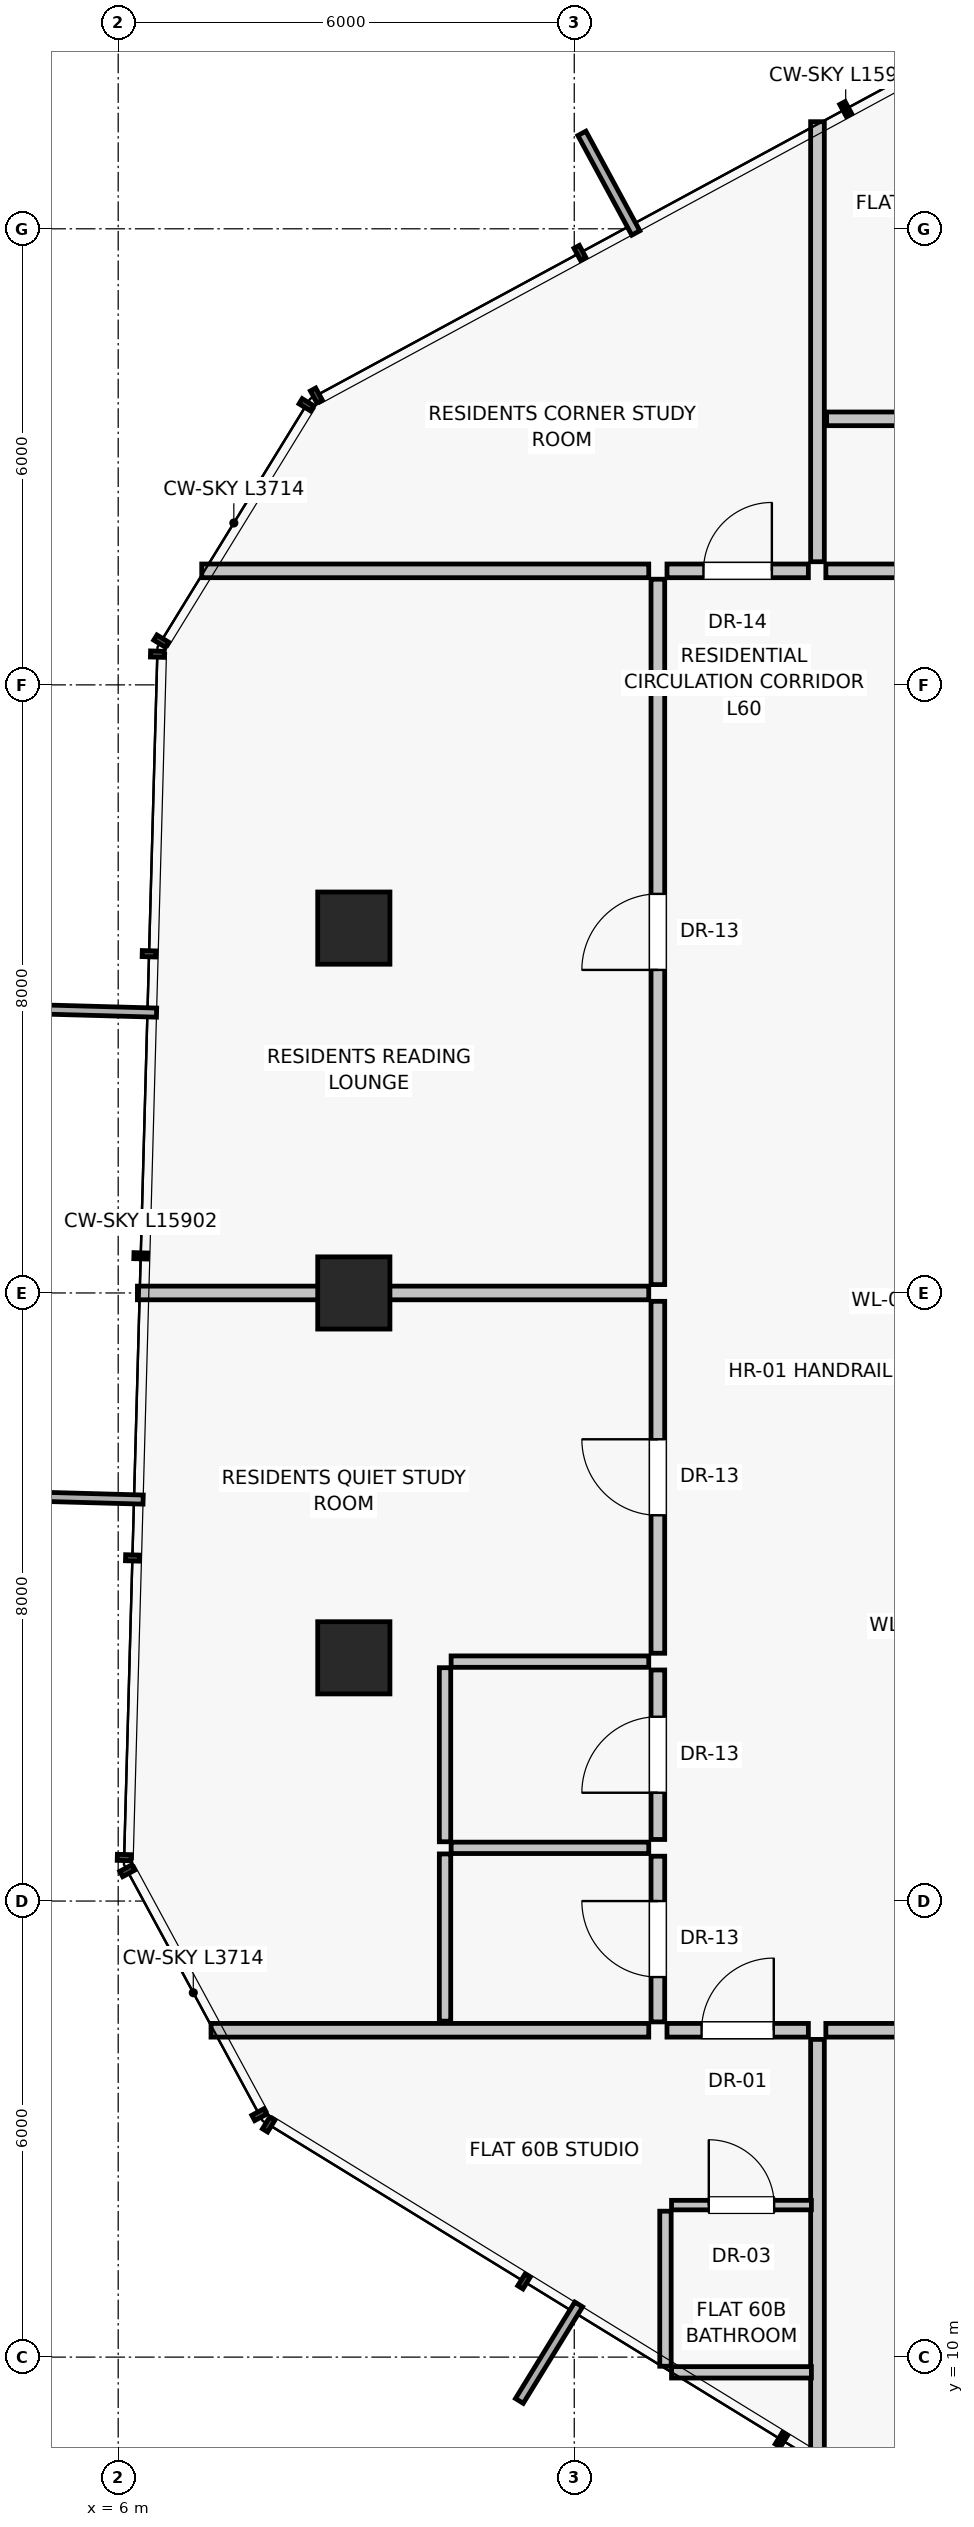
"""IFC4 building model, lengths in metres.
Left out: names, types, materials, properties, quantities, classifications, styles, units other than length and angle.
Written with IfcOpenShell. Run it as: python <this file> out.ifc"""

import sys

from ifc_helpers import new_model, si_unit, direction, frame, frame_2d, origin, origin_2d, place, context, subcontext, project, spatial, rectangle, extrude, source, transform, mapped, element, fill, save


model = new_model("IFC4")
c1 = context("Model", 3, precision=1e-05, world=origin(), true_north=direction((0.0, 1.0)))
c2 = subcontext(c1, "Body", "Model", "MODEL_VIEW")
j1 = project(units=[si_unit("LENGTHUNIT", "METRE"), si_unit("PLANEANGLEUNIT", "RADIAN")], contexts=[c1])
p1 = place(None, origin())
s1 = spatial("IfcSite", under=j1, at=p1, CompositionType="ELEMENT")
p2 = place(p1, origin())
s2 = spatial("IfcBuilding", under=s1, at=p2, CompositionType="ELEMENT")
p3 = place(p2, frame((0.0, 0.0, 211.35)))
s3 = spatial("IfcBuildingStorey", under=s2, at=p3, CompositionType="ELEMENT", Elevation=211.35)
for number, where, z_axis, x_axis in (
    (1, (9.1, 28.8, 0.0), (0.0, 0.0, 1.0), (1.0, 0.0, 0.0)),
    (2, (9.1, 24.0, 0.0), (0.0, 0.0, 1.0), (1.0, 0.0, 0.0)),
    (3, (9.1, 19.2, 0.0), (0.0, 0.0, 1.0), (1.0, 0.0, 0.0)),
):
    element("IfcColumn", number, at=place(p3, frame(where, z_axis=z_axis, x_axis=x_axis)), inside=s3, PredefinedType="COLUMN", context=c2, shape_type="SweptSolid", body=[
        extrude(rectangle(XDim=0.95, YDim=0.95, at=origin_2d()), origin(), (0.0, 0.0, 1.0), 4.3),
    ])
p4 = place(p3, frame((15.2, 14.18, 0.0), z_axis=(0.0, 0.0, 1.0), x_axis=(0.0, -1.0, 0.0)))
e4 = element("IfcWall", 4, at=p4, inside=s3, PredefinedType="PARTITIONING", context=c2, shape_type="SweptSolid", body=[
    extrude(rectangle(XDim=5.594, YDim=0.18, at=frame_2d((2.797, 0.0))), origin(), (0.0, 0.0, 1.0), 4.065),
])
p5 = place(p3, frame((15.31, 14.3, 0.0), z_axis=(0.0, 0.0, 1.0), x_axis=(1.0, 0.0, 0.0)))
e5 = element("IfcWall", 5, at=p5, inside=s3, PredefinedType="PARTITIONING", context=c2, shape_type="SweptSolid", body=[
    extrude(rectangle(XDim=8.9, YDim=0.18, at=frame_2d((4.45, 0.0))), origin(), (0.0, 0.0, 1.0), 4.065),
])
p6 = place(p5, frame((3.55, 0.0, 0.0)))
e6 = element("IfcOpeningElement", 6, at=p6, cuts=e5, PredefinedType="OPENING", context=c2, shape_type="SweptSolid", body=[
    extrude(rectangle(XDim=1.8, YDim=2.25, at=frame_2d((0.9, 1.125))), frame((0.0, 0.1, 0.0), z_axis=(0.0, -1.0, 0.0), x_axis=(1.0, 0.0, 0.0)), (0.0, 0.0, 1.0), 0.2),
])
p7 = place(p3, frame((15.2, 33.62, 0.0), z_axis=(0.0, 0.0, 1.0), x_axis=(0.0, 1.0, 0.0)))
e7 = element("IfcWall", 7, at=p7, inside=s3, PredefinedType="PARTITIONING", context=c2, shape_type="SweptSolid", body=[
    extrude(rectangle(XDim=5.789, YDim=0.18, at=frame_2d((2.895, 0.0))), origin(), (0.0, 0.0, 1.0), 4.065),
])
p8 = place(p3, frame((15.31, 33.5, 0.0), z_axis=(0.0, 0.0, 1.0), x_axis=(1.0, 0.0, 0.0)))
e8 = element("IfcWall", 8, at=p8, inside=s3, PredefinedType="PARTITIONING", context=c2, shape_type="SweptSolid", body=[
    extrude(rectangle(XDim=3.78, YDim=0.18, at=frame_2d((1.89, 0.0))), origin(), (0.0, 0.0, 1.0), 4.065),
])
p9 = place(p8, frame((1.39, 0.0, 0.0)))
e9 = element("IfcOpeningElement", 9, at=p9, cuts=e8, PredefinedType="OPENING", context=c2, shape_type="SweptSolid", body=[
    extrude(rectangle(XDim=1.0, YDim=2.01, at=frame_2d((0.5, 1.005))), frame((0.0, 0.1, 0.0), z_axis=(0.0, -1.0, 0.0), x_axis=(1.0, 0.0, 0.0)), (0.0, 0.0, 1.0), 0.2),
])
p10 = place(p3, frame((15.32, 35.5, 0.0), z_axis=(0.0, 0.0, 1.0), x_axis=(1.0, 0.0, 0.0)))
e10 = element("IfcWall", 10, at=p10, inside=s3, PredefinedType="PARTITIONING", context=c2, shape_type="SweptSolid", body=[
    extrude(rectangle(XDim=3.78, YDim=0.18, at=frame_2d((1.89, 0.0))), origin(), (0.0, 0.0, 1.0), 4.065),
])
p11 = place(p3, frame((12.98, 14.3, 0.0), z_axis=(0.0, 0.0, 1.0), x_axis=(-1.0, 0.0, 0.0)))
e11 = element("IfcWall", 11, at=p11, inside=s3, PredefinedType="PARTITIONING", context=c2, shape_type="SweptSolid", body=[
    extrude(rectangle(XDim=5.759, YDim=0.18, at=frame_2d((2.879, 0.0))), origin(), (0.0, 0.0, 1.0), 4.065),
])
p12 = place(p3, frame((12.98, 33.5, 0.0), z_axis=(0.0, 0.0, 1.0), x_axis=(-1.0, 0.0, 0.0)))
e12 = element("IfcWall", 12, at=p12, inside=s3, PredefinedType="PARTITIONING", context=c2, shape_type="SweptSolid", body=[
    extrude(rectangle(XDim=5.881, YDim=0.18, at=frame_2d((2.94, 0.0))), origin(), (0.0, 0.0, 1.0), 4.065),
])
p13 = place(p3, frame((13.1, 14.41, 0.0), z_axis=(0.0, 0.0, 1.0), x_axis=(0.0, 1.0, 0.0)))
e13 = element("IfcWall", 13, at=p13, inside=s3, PredefinedType="PARTITIONING", context=c2, shape_type="SweptSolid", body=[
    extrude(rectangle(XDim=2.18, YDim=0.18, at=frame_2d((1.09, 0.0))), origin(), (0.0, 0.0, 1.0), 4.065),
])
p14 = place(p13, frame((0.59, 0.0, 0.0)))
e14 = element("IfcOpeningElement", 14, at=p14, cuts=e13, PredefinedType="OPENING", context=c2, shape_type="SweptSolid", body=[
    extrude(rectangle(XDim=1.0, YDim=2.01, at=frame_2d((0.5, 1.005))), frame((0.0, 0.1, 0.0), z_axis=(0.0, -1.0, 0.0), x_axis=(1.0, 0.0, 0.0)), (0.0, 0.0, 1.0), 0.2),
])
p15 = place(p3, frame((13.1, 16.81, 0.0), z_axis=(0.0, 0.0, 1.0), x_axis=(0.0, 1.0, 0.0)))
e15 = element("IfcWall", 15, at=p15, inside=s3, PredefinedType="PARTITIONING", context=c2, shape_type="SweptSolid", body=[
    extrude(rectangle(XDim=2.23, YDim=0.18, at=frame_2d((1.115, 0.0))), origin(), (0.0, 0.0, 1.0), 3.712),
])
p16 = place(p15, frame((0.615, 0.0, 0.0)))
e16 = element("IfcOpeningElement", 16, at=p16, cuts=e15, PredefinedType="OPENING", context=c2, shape_type="SweptSolid", body=[
    extrude(rectangle(XDim=1.0, YDim=2.01, at=frame_2d((0.5, 1.005))), frame((0.0, 0.1, 0.0), z_axis=(0.0, -1.0, 0.0), x_axis=(1.0, 0.0, 0.0)), (0.0, 0.0, 1.0), 0.2),
])
p17 = place(p3, frame((13.1, 19.26, 0.0), z_axis=(0.0, 0.0, 1.0), x_axis=(0.0, 1.0, 0.0)))
e17 = element("IfcWall", 17, at=p17, inside=s3, PredefinedType="PARTITIONING", context=c2, shape_type="SweptSolid", body=[
    extrude(rectangle(XDim=4.63, YDim=0.18, at=frame_2d((2.315, 0.0))), origin(), (0.0, 0.0, 1.0), 3.712),
])
p18 = place(p17, frame((1.815, 0.0, 0.0)))
e18 = element("IfcOpeningElement", 18, at=p18, cuts=e17, PredefinedType="OPENING", context=c2, shape_type="SweptSolid", body=[
    extrude(rectangle(XDim=1.0, YDim=2.01, at=frame_2d((0.5, 1.005))), frame((0.0, 0.1, 0.0), z_axis=(0.0, -1.0, 0.0), x_axis=(1.0, 0.0, 0.0)), (0.0, 0.0, 1.0), 0.2),
])
p19 = place(p3, frame((13.1, 24.11, 0.0), z_axis=(0.0, 0.0, 1.0), x_axis=(0.0, 1.0, 0.0)))
e19 = element("IfcWall", 19, at=p19, inside=s3, PredefinedType="PARTITIONING", context=c2, shape_type="SweptSolid", body=[
    extrude(rectangle(XDim=9.28, YDim=0.18, at=frame_2d((4.64, 0.0))), origin(), (0.0, 0.0, 1.0), 3.712),
])
p20 = place(p19, frame((4.14, 0.0, 0.0)))
e20 = element("IfcOpeningElement", 20, at=p20, cuts=e19, PredefinedType="OPENING", context=c2, shape_type="SweptSolid", body=[
    extrude(rectangle(XDim=1.0, YDim=2.01, at=frame_2d((0.5, 1.005))), frame((0.0, 0.1, 0.0), z_axis=(0.0, -1.0, 0.0), x_axis=(1.0, 0.0, 0.0)), (0.0, 0.0, 1.0), 0.2),
])
p21 = place(p3, frame((12.98, 16.7, 0.0), z_axis=(0.0, 0.0, 1.0), x_axis=(-1.0, 0.0, 0.0)))
e21 = element("IfcWall", 21, at=p21, inside=s3, PredefinedType="PARTITIONING", context=c2, shape_type="SweptSolid", body=[
    extrude(rectangle(XDim=2.6, YDim=0.15, at=frame_2d((1.3, 0.0))), origin(), (0.0, 0.0, 1.0), 4.065),
])
p22 = place(p3, frame((12.98, 19.15, 0.0), z_axis=(0.0, 0.0, 1.0), x_axis=(-1.0, 0.0, 0.0)))
e22 = element("IfcWall", 22, at=p22, inside=s3, PredefinedType="PARTITIONING", context=c2, shape_type="SweptSolid", body=[
    extrude(rectangle(XDim=2.6, YDim=0.15, at=frame_2d((1.3, 0.0))), origin(), (0.0, 0.0, 1.0), 3.286),
])
p23 = place(p3, frame((10.3, 14.42, 0.0), z_axis=(0.0, 0.0, 1.0), x_axis=(0.0, 1.0, 0.0)))
e23 = element("IfcWall", 23, at=p23, inside=s3, PredefinedType="PARTITIONING", context=c2, shape_type="SweptSolid", body=[
    extrude(rectangle(XDim=2.2, YDim=0.15, at=frame_2d((1.1, 0.0))), origin(), (0.0, 0.0, 1.0), 4.065),
])
p24 = place(p3, frame((10.3, 16.78, 0.0), z_axis=(0.0, 0.0, 1.0), x_axis=(0.0, 1.0, 0.0)))
e24 = element("IfcWall", 24, at=p24, inside=s3, PredefinedType="PARTITIONING", context=c2, shape_type="SweptSolid", body=[
    extrude(rectangle(XDim=2.29, YDim=0.15, at=frame_2d((1.145, 0.0))), origin(), (0.0, 0.0, 1.0), 4.065),
])
p25 = place(p3, frame((12.98, 24.0, 0.0), z_axis=(0.0, 0.0, 1.0), x_axis=(-1.0, 0.0, 0.0)))
e25 = element("IfcWall", 25, at=p25, inside=s3, PredefinedType="PARTITIONING", context=c2, shape_type="SweptSolid", body=[
    extrude(rectangle(XDim=6.727, YDim=0.18, at=frame_2d((3.364, 0.0))), origin(), (0.0, 0.0, 1.0), 4.065),
])
p26 = place(p3, frame((13.22, 14.3, 0.0), z_axis=(0.0, 0.0, 1.0), x_axis=(1.0, 0.0, 0.0)))
e26 = element("IfcWall", 26, at=p26, inside=s3, PredefinedType="PARTITIONING", context=c2, shape_type="SweptSolid", body=[
    extrude(rectangle(XDim=1.86, YDim=0.18, at=frame_2d((0.93, 0.0))), origin(), (0.0, 0.0, 1.0), 4.065),
])
p27 = place(p26, frame((0.455, 0.0, 0.0)))
e27 = element("IfcOpeningElement", 27, at=p27, cuts=e26, PredefinedType="OPENING", context=c2, shape_type="SweptSolid", body=[
    extrude(rectangle(XDim=0.95, YDim=2.02, at=frame_2d((0.475, 1.01))), frame((0.0, 0.1, 0.0), z_axis=(0.0, -1.0, 0.0), x_axis=(1.0, 0.0, 0.0)), (0.0, 0.0, 1.0), 0.2),
])
p28 = place(p3, frame((13.28, 12.0, 0.0), z_axis=(0.0, 0.0, 1.0), x_axis=(1.0, 0.0, 0.0)))
e28 = element("IfcWall", 28, at=p28, inside=s3, PredefinedType="PARTITIONING", context=c2, shape_type="SweptSolid", body=[
    extrude(rectangle(XDim=1.84, YDim=0.125, at=frame_2d((0.92, 0.0))), origin(), (0.0, 0.0, 1.0), 4.065),
])
p29 = place(p28, frame((0.49, 0.0, 0.0)))
e29 = element("IfcOpeningElement", 29, at=p29, cuts=e28, PredefinedType="OPENING", context=c2, shape_type="SweptSolid", body=[
    extrude(rectangle(XDim=0.86, YDim=2.01, at=frame_2d((0.43, 1.005))), frame((0.0, 0.073, 0.0), z_axis=(0.0, -1.0, 0.0), x_axis=(1.0, 0.0, 0.0)), (0.0, 0.0, 1.0), 0.145),
])
p30 = place(p3, frame((13.28, 9.8, 0.0), z_axis=(0.0, 0.0, 1.0), x_axis=(1.0, 0.0, 0.0)))
e30 = element("IfcWall", 30, at=p30, inside=s3, PredefinedType="PARTITIONING", context=c2, shape_type="SweptSolid", body=[
    extrude(rectangle(XDim=1.84, YDim=0.15, at=frame_2d((0.92, 0.0))), origin(), (0.0, 0.0, 1.0), 4.065),
])
p31 = place(p3, frame((13.2, 9.88, 0.0), z_axis=(0.0, 0.0, 1.0), x_axis=(0.0, 1.0, 0.0)))
e31 = element("IfcWall", 31, at=p31, inside=s3, PredefinedType="PARTITIONING", context=c2, shape_type="SweptSolid", body=[
    extrude(rectangle(XDim=2.04, YDim=0.15, at=frame_2d((1.02, 0.0))), origin(), (0.0, 0.0, 1.0), 4.065),
])
p32 = place(p3, frame((13.22, 33.5, 0.0), z_axis=(0.0, 0.0, 1.0), x_axis=(1.0, 0.0, 0.0)))
e32 = element("IfcWall", 32, at=p32, inside=s3, PredefinedType="PARTITIONING", context=c2, shape_type="SweptSolid", body=[
    extrude(rectangle(XDim=1.86, YDim=0.18, at=frame_2d((0.93, 0.0))), origin(), (0.0, 0.0, 1.0), 4.065),
])
p33 = place(p32, frame((0.48, 0.0, 0.0)))
e33 = element("IfcOpeningElement", 33, at=p33, cuts=e32, PredefinedType="OPENING", context=c2, shape_type="SweptSolid", body=[
    extrude(rectangle(XDim=0.9, YDim=2.01, at=frame_2d((0.45, 1.005))), frame((0.0, 0.1, 0.0), z_axis=(0.0, -1.0, 0.0), x_axis=(1.0, 0.0, 0.0)), (0.0, 0.0, 1.0), 0.2),
])
m1 = source(origin(), c2, "Body", "SweptSolid", [
    extrude(rectangle(XDim=1.0, YDim=2.01, at=frame_2d((0.5, 1.005))), frame((0.0, 0.025, 0.0), z_axis=(0.0, -1.0, 0.0), x_axis=(1.0, 0.0, 0.0)), (0.0, 0.0, 1.0), 0.05),
])
p34 = place(p14, origin())
e34 = element("IfcDoor", 34, at=p34, inside=s3, OperationType="SINGLE_SWING_RIGHT", PredefinedType="DOOR", context=c2, shape_type="MappedRepresentation", body=[
    mapped(m1, transform((0.0, 0.0, 0.0), scale=1.0)),
])
fill(e14, e34)
p35 = place(p16, origin())
e35 = element("IfcDoor", 35, at=p35, inside=s3, OperationType="SINGLE_SWING_LEFT", PredefinedType="DOOR", context=c2, shape_type="MappedRepresentation", body=[
    mapped(m1, transform((0.0, 0.0, 0.0), scale=1.0)),
])
fill(e16, e35)
p36 = place(p18, origin())
e36 = element("IfcDoor", 36, at=p36, inside=s3, OperationType="SINGLE_SWING_RIGHT", PredefinedType="DOOR", context=c2, shape_type="MappedRepresentation", body=[
    mapped(m1, transform((0.0, 0.0, 0.0), scale=1.0)),
])
fill(e18, e36)
p37 = place(p20, origin())
e37 = element("IfcDoor", 37, at=p37, inside=s3, OperationType="SINGLE_SWING_LEFT", PredefinedType="DOOR", context=c2, shape_type="MappedRepresentation", body=[
    mapped(m1, transform((0.0, 0.0, 0.0), scale=1.0)),
])
fill(e20, e37)
m2 = source(origin(), c2, "Body", "SweptSolid", [
    extrude(rectangle(XDim=0.95, YDim=2.02, at=frame_2d((0.475, 1.01))), frame((0.0, 0.025, 0.0), z_axis=(0.0, -1.0, 0.0), x_axis=(1.0, 0.0, 0.0)), (0.0, 0.0, 1.0), 0.05),
])
p38 = place(p27, origin())
e38 = element("IfcDoor", 38, at=p38, inside=s3, OperationType="SINGLE_SWING_RIGHT", PredefinedType="DOOR", context=c2, shape_type="MappedRepresentation", body=[
    mapped(m2, transform((0.0, 0.0, 0.0), scale=1.0)),
])
fill(e27, e38)
m3 = source(origin(), c2, "Body", "SweptSolid", [
    extrude(rectangle(XDim=0.86, YDim=2.01, at=frame_2d((0.43, 1.005))), frame((0.0, 0.025, 0.0), z_axis=(0.0, -1.0, 0.0), x_axis=(1.0, 0.0, 0.0)), (0.0, 0.0, 1.0), 0.05),
])
p39 = place(p29, origin())
e39 = element("IfcDoor", 39, at=p39, inside=s3, OperationType="SINGLE_SWING_LEFT", PredefinedType="DOOR", context=c2, shape_type="MappedRepresentation", body=[
    mapped(m3, transform((0.0, 0.0, 0.0), scale=1.0)),
])
fill(e29, e39)
m4 = source(origin(), c2, "Body", "SweptSolid", [
    extrude(rectangle(XDim=0.9, YDim=2.01, at=frame_2d((0.45, 1.005))), frame((0.0, 0.025, 0.0), z_axis=(0.0, -1.0, 0.0), x_axis=(1.0, 0.0, 0.0)), (0.0, 0.0, 1.0), 0.05),
])
p40 = place(p33, origin())
e40 = element("IfcDoor", 40, at=p40, inside=s3, OperationType="SINGLE_SWING_RIGHT", PredefinedType="DOOR", context=c2, shape_type="MappedRepresentation", body=[
    mapped(m4, transform((0.0, 0.0, 0.0), scale=1.0)),
])
fill(e33, e40)
save(model, sys.argv[1])
